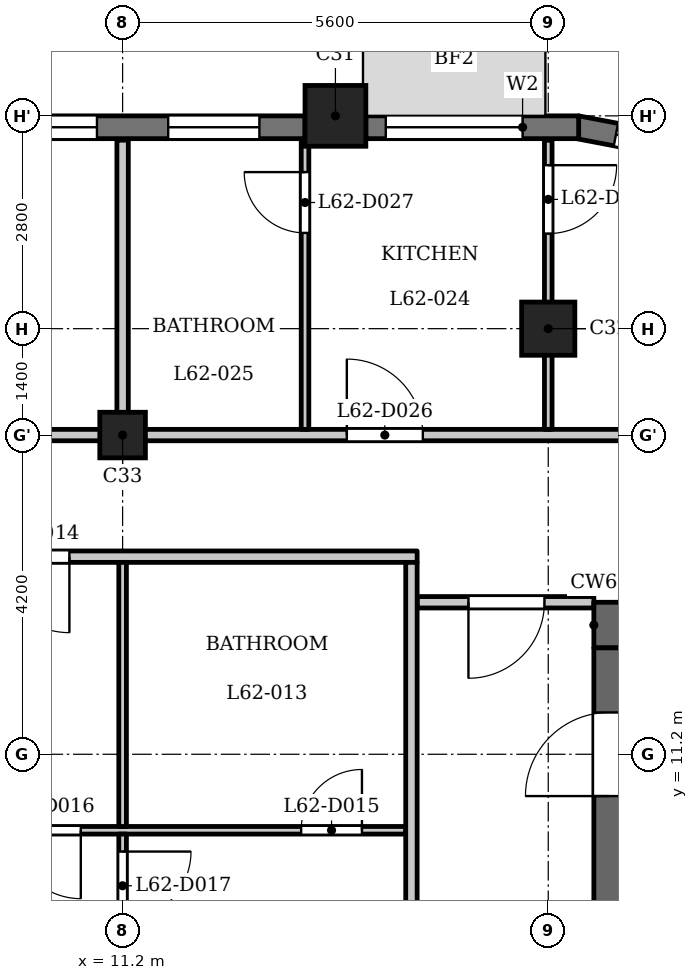
"""IFC4 building model, lengths in metres.
Left out: names, types, materials, properties, quantities, classifications, styles, units other than length and angle.
Written with IfcOpenShell. Run it as: python <this file> out.ifc"""

import sys

from ifc_helpers import new_model, si_unit, direction, frame, frame_2d, origin, origin_2d, place, context, subcontext, project, spatial, rectangle, extrude, element, fill, save


model = new_model("IFC4")
c1 = context("Model", 3, precision=1e-05, world=origin(), true_north=direction((0.0, 1.0)))
c2 = subcontext(c1, "Body", "Model", "MODEL_VIEW")
j1 = project(units=[si_unit("LENGTHUNIT", "METRE"), si_unit("PLANEANGLEUNIT", "RADIAN")], contexts=[c1])
p1 = place(None, origin())
s1 = spatial("IfcSite", under=j1, at=p1, CompositionType="ELEMENT")
p2 = place(p1, origin())
s2 = spatial("IfcBuilding", under=s1, at=p2, CompositionType="ELEMENT")
p3 = place(p2, frame((0.0, 0.0, 241.7)))
s3 = spatial("IfcBuildingStorey", under=s2, at=p3, CompositionType="ELEMENT", Elevation=241.7)
p4 = place(p3, frame((14.0, 19.6, 0.0), z_axis=(0.0, 0.0, 1.0), x_axis=(1.0, 0.0, 0.0)))
e1 = element("IfcColumn", 1, at=p4, inside=s3, PredefinedType="COLUMN", context=c2, shape_type="SweptSolid", body=[
    extrude(rectangle(XDim=0.8, YDim=0.8, at=origin_2d()), origin(), (0.0, 0.0, 1.0), 3.5),
])
p5 = place(p3, frame((16.8, 16.8, 0.0), z_axis=(0.0, 0.0, 1.0), x_axis=(1.0, 0.0, 0.0)))
e2 = element("IfcColumn", 2, at=p5, inside=s3, PredefinedType="COLUMN", context=c2, shape_type="SweptSolid", body=[
    extrude(rectangle(XDim=0.7, YDim=0.7, at=origin_2d()), origin(), (0.0, 0.0, 1.0), 3.5),
])
p6 = place(p3, frame((11.2, 15.4, 0.0), z_axis=(0.0, 0.0, 1.0), x_axis=(1.0, 0.0, 0.0)))
e3 = element("IfcColumn", 3, at=p6, inside=s3, PredefinedType="COLUMN", context=c2, shape_type="SweptSolid", body=[
    extrude(rectangle(XDim=0.6, YDim=0.6, at=origin_2d()), origin(), (0.0, 0.0, 1.0), 3.5),
])
p7 = place(p3, frame((18.995, 19.105, 0.0), z_axis=(0.0, 0.0, 1.0), x_axis=(-0.982301706131, 0.187305520826, 0.0)))
e4 = element("IfcWall", 4, at=p7, inside=s3, PredefinedType="SOLIDWALL", context=c2, shape_type="SweptSolid", body=[
    extrude(rectangle(XDim=1.856, YDim=0.3, at=frame_2d((0.928, 0.0))), origin(), (0.0, 0.0, 1.0), 2.55),
])
p8 = place(p7, frame((0.528, 0.0, 0.6)))
e5 = element("IfcOpeningElement", 5, at=p8, cuts=e4, PredefinedType="OPENING", context=c2, shape_type="SweptSolid", body=[
    extrude(rectangle(XDim=0.8, YDim=1.55, at=frame_2d((0.4, 0.775))), frame((0.0, 0.16, 0.0), z_axis=(0.0, -1.0, 0.0), x_axis=(1.0, 0.0, 0.0)), (0.0, 0.0, 1.0), 0.32),
])
p9 = place(p3, frame((17.2, 19.45, 0.0), z_axis=(0.0, 0.0, 1.0), x_axis=(-1.0, 0.0, 0.0)))
e6 = element("IfcWall", 6, at=p9, inside=s3, PredefinedType="SOLIDWALL", context=c2, shape_type="SweptSolid", body=[
    extrude(rectangle(XDim=2.8, YDim=0.3, at=frame_2d((1.4, 0.0))), origin(), (0.0, 0.0, 1.0), 2.55),
])
p10 = place(p9, frame((0.738, 0.0, 0.9)))
e7 = element("IfcOpeningElement", 7, at=p10, cuts=e6, PredefinedType="OPENING", context=c2, shape_type="SweptSolid", body=[
    extrude(rectangle(XDim=1.8, YDim=1.25, at=frame_2d((0.9, 0.625))), frame((0.0, 0.16, 0.0), z_axis=(0.0, -1.0, 0.0), x_axis=(1.0, 0.0, 0.0)), (0.0, 0.0, 1.0), 0.32),
])
p11 = place(p3, frame((13.6, 19.45, 0.0), z_axis=(0.0, 0.0, 1.0), x_axis=(-1.0, 0.0, 0.0)))
e8 = element("IfcWall", 8, at=p11, inside=s3, PredefinedType="SOLIDWALL", context=c2, shape_type="SweptSolid", body=[
    extrude(rectangle(XDim=4.8, YDim=0.3, at=frame_2d((2.4, 0.0))), origin(), (0.0, 0.0, 1.0), 2.55),
])
p12 = place(p11, frame((0.6, 0.0, 0.6)))
e9 = element("IfcOpeningElement", 9, at=p12, cuts=e8, PredefinedType="OPENING", context=c2, shape_type="SweptSolid", body=[
    extrude(rectangle(XDim=1.2, YDim=1.55, at=frame_2d((0.6, 0.775))), frame((0.0, 0.16, 0.0), z_axis=(0.0, -1.0, 0.0), x_axis=(1.0, 0.0, 0.0)), (0.0, 0.0, 1.0), 0.32),
])
p13 = place(p11, frame((2.738, 0.0, 0.9)))
e10 = element("IfcOpeningElement", 10, at=p13, cuts=e8, PredefinedType="OPENING", context=c2, shape_type="SweptSolid", body=[
    extrude(rectangle(XDim=1.8, YDim=1.25, at=frame_2d((0.9, 0.625))), frame((0.0, 0.16, 0.0), z_axis=(0.0, -1.0, 0.0), x_axis=(1.0, 0.0, 0.0)), (0.0, 0.0, 1.0), 0.32),
])
p14 = place(p3, frame((17.4, 12.9, 0.0), z_axis=(0.0, 0.0, 1.0), x_axis=(1.0, 0.0, 0.0)))
e11 = element("IfcWall", 11, at=p14, inside=s3, PredefinedType="SHEAR", context=c2, shape_type="SweptSolid", body=[
    extrude(rectangle(XDim=7.32, YDim=0.6, at=frame_2d((3.66, 0.0))), origin(), (0.0, 0.0, 1.0), 3.2),
])
p15 = place(p3, frame((17.6, -12.6, 0.0), z_axis=(0.0, 0.0, 1.0), x_axis=(0.0, 1.0, 0.0)))
e12 = element("IfcWall", 12, at=p15, inside=s3, PredefinedType="SHEAR", context=c2, shape_type="SweptSolid", body=[
    extrude(rectangle(XDim=25.2, YDim=0.4, at=frame_2d((12.6, 0.0))), origin(), (0.0, 0.0, 1.0), 3.2),
])
p16 = place(p15, frame((6.3, 0.0, 0.0)))
e13 = element("IfcOpeningElement", 13, at=p16, cuts=e12, PredefinedType="OPENING", context=c2, shape_type="SweptSolid", body=[
    extrude(rectangle(XDim=1.1, YDim=2.1, at=frame_2d((0.55, 1.05))), frame((0.0, 0.21, 0.0), z_axis=(0.0, -1.0, 0.0), x_axis=(1.0, 0.0, 0.0)), (0.0, 0.0, 1.0), 0.42),
])
p17 = place(p15, frame((8.7, 0.0, 0.0)))
e14 = element("IfcOpeningElement", 14, at=p17, cuts=e12, PredefinedType="OPENING", context=c2, shape_type="SweptSolid", body=[
    extrude(rectangle(XDim=1.1, YDim=2.1, at=frame_2d((0.55, 1.05))), frame((0.0, 0.21, 0.0), z_axis=(0.0, -1.0, 0.0), x_axis=(1.0, 0.0, 0.0)), (0.0, 0.0, 1.0), 0.42),
])
p18 = place(p15, frame((11.2, 0.0, 0.0)))
e15 = element("IfcOpeningElement", 15, at=p18, cuts=e12, PredefinedType="OPENING", context=c2, shape_type="SweptSolid", body=[
    extrude(rectangle(XDim=0.9, YDim=2.1, at=frame_2d((0.45, 1.05))), frame((0.0, 0.21, 0.0), z_axis=(0.0, -1.0, 0.0), x_axis=(1.0, 0.0, 0.0)), (0.0, 0.0, 1.0), 0.42),
])
p19 = place(p15, frame((15.75, 0.0, 0.0)))
e16 = element("IfcOpeningElement", 16, at=p19, cuts=e12, PredefinedType="OPENING", context=c2, shape_type="SweptSolid", body=[
    extrude(rectangle(XDim=1.1, YDim=2.1, at=frame_2d((0.55, 1.05))), frame((0.0, 0.21, 0.0), z_axis=(0.0, -1.0, 0.0), x_axis=(1.0, 0.0, 0.0)), (0.0, 0.0, 1.0), 0.42),
])
p20 = place(p15, frame((18.15, 0.0, 0.0)))
e17 = element("IfcOpeningElement", 17, at=p20, cuts=e12, PredefinedType="OPENING", context=c2, shape_type="SweptSolid", body=[
    extrude(rectangle(XDim=1.1, YDim=2.1, at=frame_2d((0.55, 1.05))), frame((0.0, 0.21, 0.0), z_axis=(0.0, -1.0, 0.0), x_axis=(1.0, 0.0, 0.0)), (0.0, 0.0, 1.0), 0.42),
])
p21 = place(p15, frame((23.25, 0.0, 0.0)))
e18 = element("IfcOpeningElement", 18, at=p21, cuts=e12, PredefinedType="OPENING", context=c2, shape_type="SweptSolid", body=[
    extrude(rectangle(XDim=1.1, YDim=2.1, at=frame_2d((0.55, 1.05))), frame((0.0, 0.21, 0.0), z_axis=(0.0, -1.0, 0.0), x_axis=(1.0, 0.0, 0.0)), (0.0, 0.0, 1.0), 0.42),
])
p22 = place(p15, frame((0.85, 0.0, 0.0)))
e19 = element("IfcOpeningElement", 19, at=p22, cuts=e12, PredefinedType="OPENING", context=c2, shape_type="SweptSolid", body=[
    extrude(rectangle(XDim=1.1, YDim=2.1, at=frame_2d((0.55, 1.05))), frame((0.0, 0.21, 0.0), z_axis=(0.0, -1.0, 0.0), x_axis=(1.0, 0.0, 0.0)), (0.0, 0.0, 1.0), 0.42),
])
p23 = place(p15, frame((13.075, 0.0, 0.0)))
e20 = element("IfcOpeningElement", 20, at=p23, cuts=e12, PredefinedType="OPENING", context=c2, shape_type="SweptSolid", body=[
    extrude(rectangle(XDim=1.8, YDim=2.1, at=frame_2d((0.9, 1.05))), frame((0.0, 0.21, 0.0), z_axis=(0.0, -1.0, 0.0), x_axis=(1.0, 0.0, 0.0)), (0.0, 0.0, 1.0), 0.42),
])
p24 = place(p3, frame((-14.925, 10.2, 0.0), z_axis=(0.0, 0.0, 1.0), x_axis=(1.0, 0.0, 0.0)))
e21 = element("IfcWall", 21, at=p24, inside=s3, PredefinedType="PARTITIONING", context=c2, shape_type="SweptSolid", body=[
    extrude(rectangle(XDim=29.85, YDim=0.1, at=frame_2d((14.925, 0.0))), origin(), (0.0, 0.0, 1.0), 3.2),
])
p25 = place(p24, frame((13.475, 0.0, 0.0)))
e22 = element("IfcOpeningElement", 22, at=p25, cuts=e21, PredefinedType="OPENING", context=c2, shape_type="SweptSolid", body=[
    extrude(rectangle(XDim=0.9, YDim=2.1, at=frame_2d((0.45, 1.05))), frame((0.0, 0.06, 0.0), z_axis=(0.0, -1.0, 0.0), x_axis=(1.0, 0.0, 0.0)), (0.0, 0.0, 1.0), 0.12),
])
p26 = place(p24, frame((4.375, 0.0, 0.0)))
e23 = element("IfcOpeningElement", 23, at=p26, cuts=e21, PredefinedType="OPENING", context=c2, shape_type="SweptSolid", body=[
    extrude(rectangle(XDim=0.9, YDim=2.1, at=frame_2d((0.45, 1.05))), frame((0.0, 0.06, 0.0), z_axis=(0.0, -1.0, 0.0), x_axis=(1.0, 0.0, 0.0)), (0.0, 0.0, 1.0), 0.12),
])
p27 = place(p24, frame((15.475, 0.0, 0.0)))
e24 = element("IfcOpeningElement", 24, at=p27, cuts=e21, PredefinedType="OPENING", context=c2, shape_type="SweptSolid", body=[
    extrude(rectangle(XDim=0.8, YDim=2.1, at=frame_2d((0.4, 1.05))), frame((0.0, 0.06, 0.0), z_axis=(0.0, -1.0, 0.0), x_axis=(1.0, 0.0, 0.0)), (0.0, 0.0, 1.0), 0.12),
])
p28 = place(p24, frame((18.825, 0.0, 0.0)))
e25 = element("IfcOpeningElement", 25, at=p28, cuts=e21, PredefinedType="OPENING", context=c2, shape_type="SweptSolid", body=[
    extrude(rectangle(XDim=0.9, YDim=2.1, at=frame_2d((0.45, 1.05))), frame((0.0, 0.06, 0.0), z_axis=(0.0, -1.0, 0.0), x_axis=(1.0, 0.0, 0.0)), (0.0, 0.0, 1.0), 0.12),
])
p29 = place(p24, frame((28.474, 0.0, 0.0)))
e26 = element("IfcOpeningElement", 26, at=p29, cuts=e21, PredefinedType="OPENING", context=c2, shape_type="SweptSolid", body=[
    extrude(rectangle(XDim=0.8, YDim=2.1, at=frame_2d((0.4, 1.05))), frame((0.0, 0.06, 0.0), z_axis=(0.0, -1.0, 0.0), x_axis=(1.0, 0.0, 0.0)), (0.0, 0.0, 1.0), 0.12),
])
p30 = place(p24, frame((24.675, 0.0, 0.0)))
e27 = element("IfcOpeningElement", 27, at=p30, cuts=e21, PredefinedType="OPENING", context=c2, shape_type="SweptSolid", body=[
    extrude(rectangle(XDim=0.9, YDim=2.1, at=frame_2d((0.45, 1.05))), frame((0.0, 0.06, 0.0), z_axis=(0.0, -1.0, 0.0), x_axis=(1.0, 0.0, 0.0)), (0.0, 0.0, 1.0), 0.12),
])
p31 = place(p3, frame((15.075, 13.2, 0.0), z_axis=(0.0, 0.0, 1.0), x_axis=(1.0, 0.0, 0.0)))
e28 = element("IfcWall", 28, at=p31, inside=s3, PredefinedType="PARTITIONING", context=c2, shape_type="SweptSolid", body=[
    extrude(rectangle(XDim=2.325, YDim=0.15, at=frame_2d((1.163, 0.0))), origin(), (0.0, 0.0, 1.0), 3.2),
])
p32 = place(p31, frame((0.675, 0.0, 0.0)))
e29 = element("IfcOpeningElement", 29, at=p32, cuts=e28, PredefinedType="OPENING", context=c2, shape_type="SweptSolid", body=[
    extrude(rectangle(XDim=1.0, YDim=2.1, at=frame_2d((0.5, 1.05))), frame((0.0, 0.085, 0.0), z_axis=(0.0, -1.0, 0.0), x_axis=(1.0, 0.0, 0.0)), (0.0, 0.0, 1.0), 0.17),
])
p33 = place(p3, frame((-15.075, 13.8, 0.0), z_axis=(0.0, 0.0, 1.0), x_axis=(1.0, 0.0, 0.0)))
e30 = element("IfcWall", 30, at=p33, inside=s3, PredefinedType="PARTITIONING", context=c2, shape_type="SweptSolid", body=[
    extrude(rectangle(XDim=30.15, YDim=0.15, at=frame_2d((15.075, 0.0))), origin(), (0.0, 0.0, 1.0), 3.2),
])
p34 = place(p33, frame((10.125, 0.0, 0.0)))
e31 = element("IfcOpeningElement", 31, at=p34, cuts=e30, PredefinedType="OPENING", context=c2, shape_type="SweptSolid", body=[
    extrude(rectangle(XDim=1.0, YDim=2.1, at=frame_2d((0.5, 1.05))), frame((0.0, 0.085, 0.0), z_axis=(0.0, -1.0, 0.0), x_axis=(1.0, 0.0, 0.0)), (0.0, 0.0, 1.0), 0.17),
])
p35 = place(p33, frame((18.975, 0.0, 0.0)))
e32 = element("IfcOpeningElement", 32, at=p35, cuts=e30, PredefinedType="OPENING", context=c2, shape_type="SweptSolid", body=[
    extrude(rectangle(XDim=1.0, YDim=2.1, at=frame_2d((0.5, 1.05))), frame((0.0, 0.085, 0.0), z_axis=(0.0, -1.0, 0.0), x_axis=(1.0, 0.0, 0.0)), (0.0, 0.0, 1.0), 0.17),
])
p36 = place(p33, frame((24.575, 0.0, 0.0)))
e33 = element("IfcOpeningElement", 33, at=p36, cuts=e30, PredefinedType="OPENING", context=c2, shape_type="SweptSolid", body=[
    extrude(rectangle(XDim=1.0, YDim=2.1, at=frame_2d((0.5, 1.05))), frame((0.0, 0.085, 0.0), z_axis=(0.0, -1.0, 0.0), x_axis=(1.0, 0.0, 0.0)), (0.0, 0.0, 1.0), 0.17),
])
p37 = place(p3, frame((-23.55, 15.4, 0.0), z_axis=(0.0, 0.0, 1.0), x_axis=(1.0, 0.0, 0.0)))
e34 = element("IfcWall", 34, at=p37, inside=s3, PredefinedType="PARTITIONING", context=c2, shape_type="SweptSolid", body=[
    extrude(rectangle(XDim=46.872, YDim=0.15, at=frame_2d((23.436, 0.0))), origin(), (0.0, 0.0, 1.0), 3.2),
])
p38 = place(p37, frame((12.9, 0.0, 0.0)))
e35 = element("IfcOpeningElement", 35, at=p38, cuts=e34, PredefinedType="OPENING", context=c2, shape_type="SweptSolid", body=[
    extrude(rectangle(XDim=1.0, YDim=2.1, at=frame_2d((0.5, 1.05))), frame((0.0, 0.085, 0.0), z_axis=(0.0, -1.0, 0.0), x_axis=(1.0, 0.0, 0.0)), (0.0, 0.0, 1.0), 0.17),
])
p39 = place(p37, frame((20.9, 0.0, 0.0)))
e36 = element("IfcOpeningElement", 36, at=p39, cuts=e34, PredefinedType="OPENING", context=c2, shape_type="SweptSolid", body=[
    extrude(rectangle(XDim=1.0, YDim=2.1, at=frame_2d((0.5, 1.05))), frame((0.0, 0.085, 0.0), z_axis=(0.0, -1.0, 0.0), x_axis=(1.0, 0.0, 0.0)), (0.0, 0.0, 1.0), 0.17),
])
p40 = place(p37, frame((37.7, 0.0, 0.0)))
e37 = element("IfcOpeningElement", 37, at=p40, cuts=e34, PredefinedType="OPENING", context=c2, shape_type="SweptSolid", body=[
    extrude(rectangle(XDim=1.0, YDim=2.1, at=frame_2d((0.5, 1.05))), frame((0.0, 0.085, 0.0), z_axis=(0.0, -1.0, 0.0), x_axis=(1.0, 0.0, 0.0)), (0.0, 0.0, 1.0), 0.17),
])
p41 = place(p3, frame((11.2, 7.32, 0.0), z_axis=(0.0, 0.0, 1.0), x_axis=(0.0, 1.0, 0.0)))
e38 = element("IfcWall", 38, at=p41, inside=s3, PredefinedType="PARTITIONING", context=c2, shape_type="SweptSolid", body=[
    extrude(rectangle(XDim=2.83, YDim=0.1, at=frame_2d((1.415, 0.0))), origin(), (0.0, 0.0, 1.0), 3.2),
])
p42 = place(p41, frame((1.7, 0.0, 0.0)))
e39 = element("IfcOpeningElement", 39, at=p42, cuts=e38, PredefinedType="OPENING", context=c2, shape_type="SweptSolid", body=[
    extrude(rectangle(XDim=0.9, YDim=2.1, at=frame_2d((0.45, 1.05))), frame((0.0, 0.06, 0.0), z_axis=(0.0, -1.0, 0.0), x_axis=(1.0, 0.0, 0.0)), (0.0, 0.0, 1.0), 0.12),
])
p43 = place(p3, frame((11.2, 10.25, 0.0), z_axis=(0.0, 0.0, 1.0), x_axis=(0.0, 1.0, 0.0)))
e40 = element("IfcWall", 40, at=p43, inside=s3, PredefinedType="PARTITIONING", context=c2, shape_type="SweptSolid", body=[
    extrude(rectangle(XDim=3.475, YDim=0.1, at=frame_2d((1.738, 0.0))), origin(), (0.0, 0.0, 1.0), 3.2),
])
p44 = place(p3, frame((11.2, 15.475, 0.0), z_axis=(0.0, 0.0, 1.0), x_axis=(0.0, 1.0, 0.0)))
e41 = element("IfcWall", 41, at=p44, inside=s3, PredefinedType="PARTITIONING", context=c2, shape_type="SweptSolid", body=[
    extrude(rectangle(XDim=3.805, YDim=0.15, at=frame_2d((1.902, 0.0))), origin(), (0.0, 0.0, 1.0), 3.2),
])
p45 = place(p3, frame((13.6, 15.475, 0.0), z_axis=(0.0, 0.0, 1.0), x_axis=(0.0, 1.0, 0.0)))
e42 = element("IfcWall", 42, at=p45, inside=s3, PredefinedType="PARTITIONING", context=c2, shape_type="SweptSolid", body=[
    extrude(rectangle(XDim=3.805, YDim=0.1, at=frame_2d((1.902, 0.0))), origin(), (0.0, 0.0, 1.0), 3.2),
])
p46 = place(p45, frame((2.585, 0.0, 0.0)))
e43 = element("IfcOpeningElement", 43, at=p46, cuts=e42, PredefinedType="OPENING", context=c2, shape_type="SweptSolid", body=[
    extrude(rectangle(XDim=0.8, YDim=2.1, at=frame_2d((0.4, 1.05))), frame((0.0, 0.06, 0.0), z_axis=(0.0, -1.0, 0.0), x_axis=(1.0, 0.0, 0.0)), (0.0, 0.0, 1.0), 0.12),
])
p47 = place(p3, frame((15.0, 6.769, 0.0), z_axis=(0.0, 0.0, 1.0), x_axis=(0.0, 1.0, 0.0)))
e44 = element("IfcWall", 44, at=p47, inside=s3, PredefinedType="PARTITIONING", context=c2, shape_type="SweptSolid", body=[
    extrude(rectangle(XDim=6.956, YDim=0.15, at=frame_2d((3.478, 0.0))), origin(), (0.0, 0.0, 1.0), 3.2),
])
p48 = place(p3, frame((16.8, 15.475, 0.0), z_axis=(0.0, 0.0, 1.0), x_axis=(0.0, 1.0, 0.0)))
e45 = element("IfcWall", 45, at=p48, inside=s3, PredefinedType="PARTITIONING", context=c2, shape_type="SweptSolid", body=[
    extrude(rectangle(XDim=3.805, YDim=0.1, at=frame_2d((1.902, 0.0))), origin(), (0.0, 0.0, 1.0), 3.2),
])
p49 = place(p48, frame((2.576, 0.0, 0.0)))
e46 = element("IfcOpeningElement", 46, at=p49, cuts=e45, PredefinedType="OPENING", context=c2, shape_type="SweptSolid", body=[
    extrude(rectangle(XDim=0.9, YDim=2.1, at=frame_2d((0.45, 1.05))), frame((0.0, 0.06, 0.0), z_axis=(0.0, -1.0, 0.0), x_axis=(1.0, 0.0, 0.0)), (0.0, 0.0, 1.0), 0.12),
])
p50 = place(p21, origin())
e47 = element("IfcDoor", 47, at=p50, inside=s3, OperationType="SINGLE_SWING_RIGHT", PredefinedType="DOOR", context=c2, shape_type="SweptSolid", body=[
    extrude(rectangle(XDim=1.1, YDim=2.1, at=frame_2d((0.55, 1.05))), frame((0.0, 0.025, 0.0), z_axis=(0.0, -1.0, 0.0), x_axis=(1.0, 0.0, 0.0)), (0.0, 0.0, 1.0), 0.05),
])
fill(e18, e47)
p51 = place(p32, origin())
e48 = element("IfcDoor", 48, at=p51, inside=s3, OperationType="SINGLE_SWING_LEFT", PredefinedType="DOOR", context=c2, shape_type="SweptSolid", body=[
    extrude(rectangle(XDim=1.0, YDim=2.1, at=frame_2d((0.5, 1.05))), frame((0.0, 0.025, 0.0), z_axis=(0.0, -1.0, 0.0), x_axis=(1.0, 0.0, 0.0)), (0.0, 0.0, 1.0), 0.05),
])
fill(e29, e48)
p52 = place(p36, origin())
e49 = element("IfcDoor", 49, at=p52, inside=s3, OperationType="SINGLE_SWING_RIGHT", PredefinedType="DOOR", context=c2, shape_type="SweptSolid", body=[
    extrude(rectangle(XDim=1.0, YDim=2.1, at=frame_2d((0.5, 1.05))), frame((0.0, 0.025, 0.0), z_axis=(0.0, -1.0, 0.0), x_axis=(1.0, 0.0, 0.0)), (0.0, 0.0, 1.0), 0.05),
])
fill(e33, e49)
p53 = place(p29, origin())
e50 = element("IfcDoor", 50, at=p53, inside=s3, OperationType="SINGLE_SWING_LEFT", PredefinedType="DOOR", context=c2, shape_type="SweptSolid", body=[
    extrude(rectangle(XDim=0.8, YDim=2.1, at=frame_2d((0.4, 1.05))), frame((0.0, 0.025, 0.0), z_axis=(0.0, -1.0, 0.0), x_axis=(1.0, 0.0, 0.0)), (0.0, 0.0, 1.0), 0.05),
])
fill(e26, e50)
p54 = place(p30, origin())
e51 = element("IfcDoor", 51, at=p54, inside=s3, OperationType="SINGLE_SWING_RIGHT", PredefinedType="DOOR", context=c2, shape_type="SweptSolid", body=[
    extrude(rectangle(XDim=0.9, YDim=2.1, at=frame_2d((0.45, 1.05))), frame((0.0, 0.025, 0.0), z_axis=(0.0, -1.0, 0.0), x_axis=(1.0, 0.0, 0.0)), (0.0, 0.0, 1.0), 0.05),
])
fill(e27, e51)
p55 = place(p42, origin())
e52 = element("IfcDoor", 52, at=p55, inside=s3, OperationType="SINGLE_SWING_RIGHT", PredefinedType="DOOR", context=c2, shape_type="SweptSolid", body=[
    extrude(rectangle(XDim=0.9, YDim=2.1, at=frame_2d((0.45, 1.05))), frame((0.0, 0.025, 0.0), z_axis=(0.0, -1.0, 0.0), x_axis=(1.0, 0.0, 0.0)), (0.0, 0.0, 1.0), 0.05),
])
fill(e39, e52)
p56 = place(p40, origin())
e53 = element("IfcDoor", 53, at=p56, inside=s3, OperationType="SINGLE_SWING_RIGHT", PredefinedType="DOOR", context=c2, shape_type="SweptSolid", body=[
    extrude(rectangle(XDim=1.0, YDim=2.1, at=frame_2d((0.5, 1.05))), frame((0.0, 0.025, 0.0), z_axis=(0.0, -1.0, 0.0), x_axis=(1.0, 0.0, 0.0)), (0.0, 0.0, 1.0), 0.05),
])
fill(e37, e53)
p57 = place(p46, origin())
e54 = element("IfcDoor", 54, at=p57, inside=s3, OperationType="SINGLE_SWING_LEFT", PredefinedType="DOOR", context=c2, shape_type="SweptSolid", body=[
    extrude(rectangle(XDim=0.8, YDim=2.1, at=frame_2d((0.4, 1.05))), frame((0.0, 0.025, 0.0), z_axis=(0.0, -1.0, 0.0), x_axis=(1.0, 0.0, 0.0)), (0.0, 0.0, 1.0), 0.05),
])
fill(e43, e54)
p58 = place(p49, origin())
e55 = element("IfcDoor", 55, at=p58, inside=s3, OperationType="SINGLE_SWING_RIGHT", PredefinedType="DOOR", context=c2, shape_type="SweptSolid", body=[
    extrude(rectangle(XDim=0.9, YDim=2.1, at=frame_2d((0.45, 1.05))), frame((0.0, 0.025, 0.0), z_axis=(0.0, -1.0, 0.0), x_axis=(1.0, 0.0, 0.0)), (0.0, 0.0, 1.0), 0.05),
])
fill(e46, e55)
p59 = place(p8, origin())
e56 = element("IfcWindow", 56, at=p59, inside=s3, PartitioningType="SINGLE_PANEL", PredefinedType="WINDOW", context=c2, shape_type="SweptSolid", body=[
    extrude(rectangle(XDim=0.8, YDim=1.55, at=frame_2d((0.4, 0.775))), frame((0.0, 0.03, 0.0), z_axis=(0.0, -1.0, 0.0), x_axis=(1.0, 0.0, 0.0)), (0.0, 0.0, 1.0), 0.06),
])
fill(e5, e56)
p60 = place(p10, origin())
e57 = element("IfcWindow", 57, at=p60, inside=s3, PartitioningType="SINGLE_PANEL", PredefinedType="WINDOW", context=c2, shape_type="SweptSolid", body=[
    extrude(rectangle(XDim=1.8, YDim=1.25, at=frame_2d((0.9, 0.625))), frame((0.0, 0.03, 0.0), z_axis=(0.0, -1.0, 0.0), x_axis=(1.0, 0.0, 0.0)), (0.0, 0.0, 1.0), 0.06),
])
fill(e7, e57)
p61 = place(p12, origin())
e58 = element("IfcWindow", 58, at=p61, inside=s3, PartitioningType="SINGLE_PANEL", PredefinedType="WINDOW", context=c2, shape_type="SweptSolid", body=[
    extrude(rectangle(XDim=1.2, YDim=1.55, at=frame_2d((0.6, 0.775))), frame((0.0, 0.03, 0.0), z_axis=(0.0, -1.0, 0.0), x_axis=(1.0, 0.0, 0.0)), (0.0, 0.0, 1.0), 0.06),
])
fill(e9, e58)
p62 = place(p13, origin())
e59 = element("IfcWindow", 59, at=p62, inside=s3, PartitioningType="SINGLE_PANEL", PredefinedType="WINDOW", context=c2, shape_type="SweptSolid", body=[
    extrude(rectangle(XDim=1.8, YDim=1.25, at=frame_2d((0.9, 0.625))), frame((0.0, 0.03, 0.0), z_axis=(0.0, -1.0, 0.0), x_axis=(1.0, 0.0, 0.0)), (0.0, 0.0, 1.0), 0.06),
])
fill(e10, e59)
save(model, sys.argv[1])
